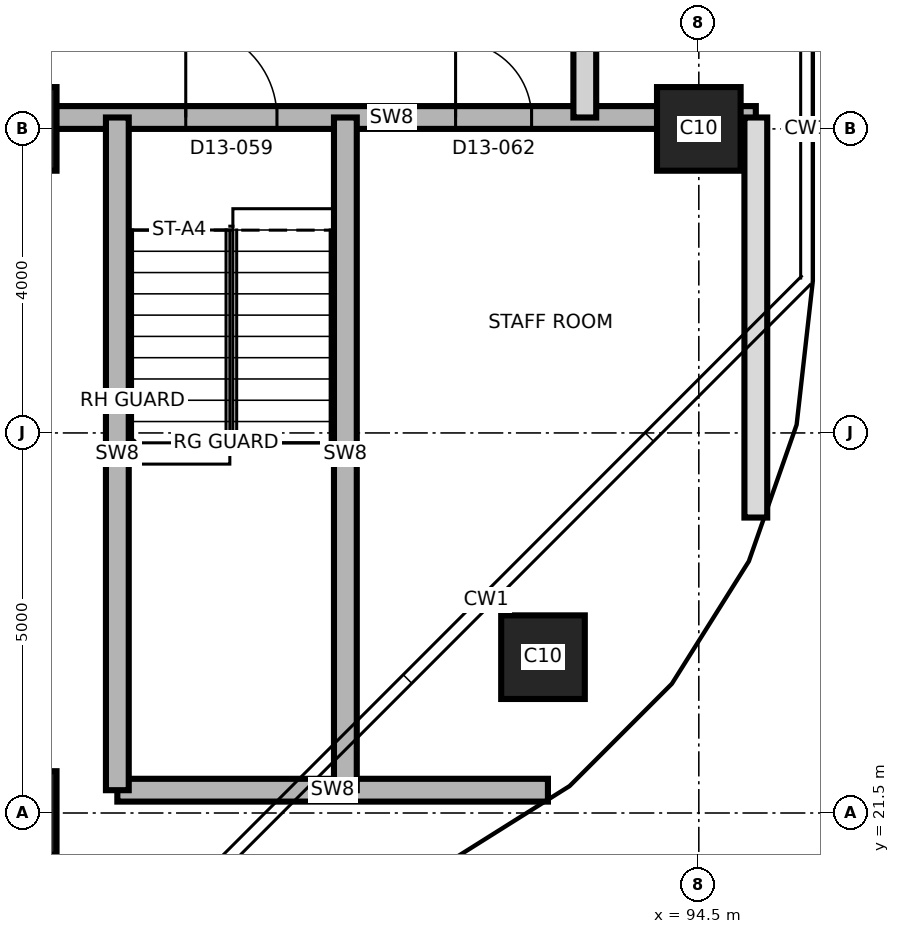
"""IFC4 building model, lengths in metres.
Left out: names, types, materials, properties, quantities, classifications, styles, units other than length and angle.
Written with IfcOpenShell. Run it as: python <this file> out.ifc"""

import sys

from ifc_helpers import new_model, si_unit, direction, frame, frame_2d, origin, origin_2d, place, context, subcontext, project, spatial, rectangle, extrude, element, fill, save


model = new_model("IFC4")
c1 = context("Model", 3, precision=1e-05, world=origin(), true_north=direction((0.0, 1.0)))
c2 = subcontext(c1, "Body", "Model", "MODEL_VIEW")
j1 = project(units=[si_unit("LENGTHUNIT", "METRE"), si_unit("PLANEANGLEUNIT", "RADIAN")], contexts=[c1])
p1 = place(None, origin())
s1 = spatial("IfcSite", under=j1, at=p1, CompositionType="ELEMENT")
p2 = place(p1, origin())
s2 = spatial("IfcBuilding", under=s1, at=p2, CompositionType="ELEMENT")
p3 = place(p2, frame((0.0, 0.0, 142.2)))
s3 = spatial("IfcBuildingStorey", under=s2, at=p3, CompositionType="ELEMENT", Elevation=142.2)
for number, where, z_axis, x_axis in (
    (1, (85.5, 21.5, 0.0), (0.0, 0.0, 1.0), (1.0, 0.0, 0.0)),
    (2, (92.45, 23.55, 0.0), (0.0, 0.0, 1.0), (1.0, 0.0, 0.0)),
    (3, (85.5, 30.5, 0.0), (0.0, 0.0, 1.0), (1.0, 0.0, 0.0)),
    (4, (94.5, 30.5, 0.0), (0.0, 0.0, 1.0), (1.0, 0.0, 0.0)),
):
    element("IfcColumn", number, at=place(p3, frame(where, z_axis=z_axis, x_axis=x_axis)), inside=s3, PredefinedType="COLUMN", context=c2, shape_type="SweptSolid", body=[
        extrude(rectangle(XDim=1.1, YDim=1.1, at=origin_2d()), origin(), (0.0, 0.0, 1.0), 3.7),
    ])
p4 = place(p3, frame((86.85, 21.8, 0.0), z_axis=(0.0, 0.0, 1.0), x_axis=(1.0, 0.0, 0.0)))
e5 = element("IfcWall", 5, at=p4, inside=s3, PredefinedType="SHEAR", context=c2, shape_type="SweptSolid", body=[
    extrude(rectangle(XDim=5.665, YDim=0.3, at=frame_2d((2.833, 0.0))), origin(), (0.0, 0.0, 1.0), 3.4),
])
p5 = place(p3, frame((85.67, 30.65, 0.0), z_axis=(0.0, 0.0, 1.0), x_axis=(1.0, 0.0, 0.0)))
e6 = element("IfcWall", 6, at=p5, inside=s3, PredefinedType="SHEAR", context=c2, shape_type="SweptSolid", body=[
    extrude(rectangle(XDim=9.58, YDim=0.3, at=frame_2d((4.79, 0.0))), origin(), (0.0, 0.0, 1.0), 3.4),
])
p6 = place(p5, frame((2.08, 0.0, 0.0)))
e7 = element("IfcOpeningElement", 7, at=p6, cuts=e6, PredefinedType="OPENING", context=c2, shape_type="SweptSolid", body=[
    extrude(rectangle(XDim=1.2, YDim=2.1, at=frame_2d((0.6, 1.05))), frame((0.0, 0.16, 0.0), z_axis=(0.0, -1.0, 0.0), x_axis=(1.0, 0.0, 0.0)), (0.0, 0.0, 1.0), 0.32),
])
p7 = place(p5, frame((5.63, 0.0, 0.0)))
e8 = element("IfcOpeningElement", 8, at=p7, cuts=e6, PredefinedType="OPENING", context=c2, shape_type="SweptSolid", body=[
    extrude(rectangle(XDim=1.0, YDim=2.1, at=frame_2d((0.5, 1.05))), frame((0.0, 0.16, 0.0), z_axis=(0.0, -1.0, 0.0), x_axis=(1.0, 0.0, 0.0)), (0.0, 0.0, 1.0), 0.32),
])
for number, where, z_axis, x_axis in (
    (9, (86.85, 21.8, 0.0), (0.0, 0.0, 1.0), (0.0, 1.0, 0.0)),
    (10, (89.85, 21.8, 0.0), (0.0, 0.0, 1.0), (0.0, 1.0, 0.0)),
):
    element("IfcWall", number, at=place(p3, frame(where, z_axis=z_axis, x_axis=x_axis)), inside=s3, PredefinedType="SHEAR", context=c2, shape_type="SweptSolid", body=[
        extrude(rectangle(XDim=8.85, YDim=0.3, at=frame_2d((4.425, 0.0))), origin(), (0.0, 0.0, 1.0), 3.4),
    ])
p8 = place(p3, frame((93.0, 30.65, 0.0), z_axis=(0.0, 0.0, 1.0), x_axis=(0.0, 1.0, 0.0)))
e11 = element("IfcWall", 11, at=p8, inside=s3, PredefinedType="PARTITIONING", context=c2, shape_type="SweptSolid", body=[
    extrude(rectangle(XDim=2.7, YDim=0.3, at=frame_2d((1.35, 0.0))), origin(), (0.0, 0.0, 1.0), 3.4),
])
p9 = place(p3, frame((95.25, 25.387, 0.0), z_axis=(0.0, 0.0, 1.0), x_axis=(0.0, 1.0, 0.0)))
e12 = element("IfcWall", 12, at=p9, inside=s3, PredefinedType="PARTITIONING", context=c2, shape_type="SweptSolid", body=[
    extrude(rectangle(XDim=5.263, YDim=0.3, at=frame_2d((2.631, 0.0))), origin(), (0.0, 0.0, 1.0), 3.4),
])
p10 = place(p6, origin())
e13 = element("IfcDoor", 13, at=p10, inside=s3, OperationType="SINGLE_SWING_LEFT", PredefinedType="DOOR", context=c2, shape_type="SweptSolid", body=[
    extrude(rectangle(XDim=1.2, YDim=2.1, at=frame_2d((0.6, 1.05))), frame((0.0, 0.025, 0.0), z_axis=(0.0, -1.0, 0.0), x_axis=(1.0, 0.0, 0.0)), (0.0, 0.0, 1.0), 0.05),
])
fill(e7, e13)
p11 = place(p7, origin())
e14 = element("IfcDoor", 14, at=p11, inside=s3, OperationType="SINGLE_SWING_LEFT", PredefinedType="DOOR", context=c2, shape_type="SweptSolid", body=[
    extrude(rectangle(XDim=1.0, YDim=2.1, at=frame_2d((0.5, 1.05))), frame((0.0, 0.025, 0.0), z_axis=(0.0, -1.0, 0.0), x_axis=(1.0, 0.0, 0.0)), (0.0, 0.0, 1.0), 0.05),
])
fill(e8, e14)
save(model, sys.argv[1])
